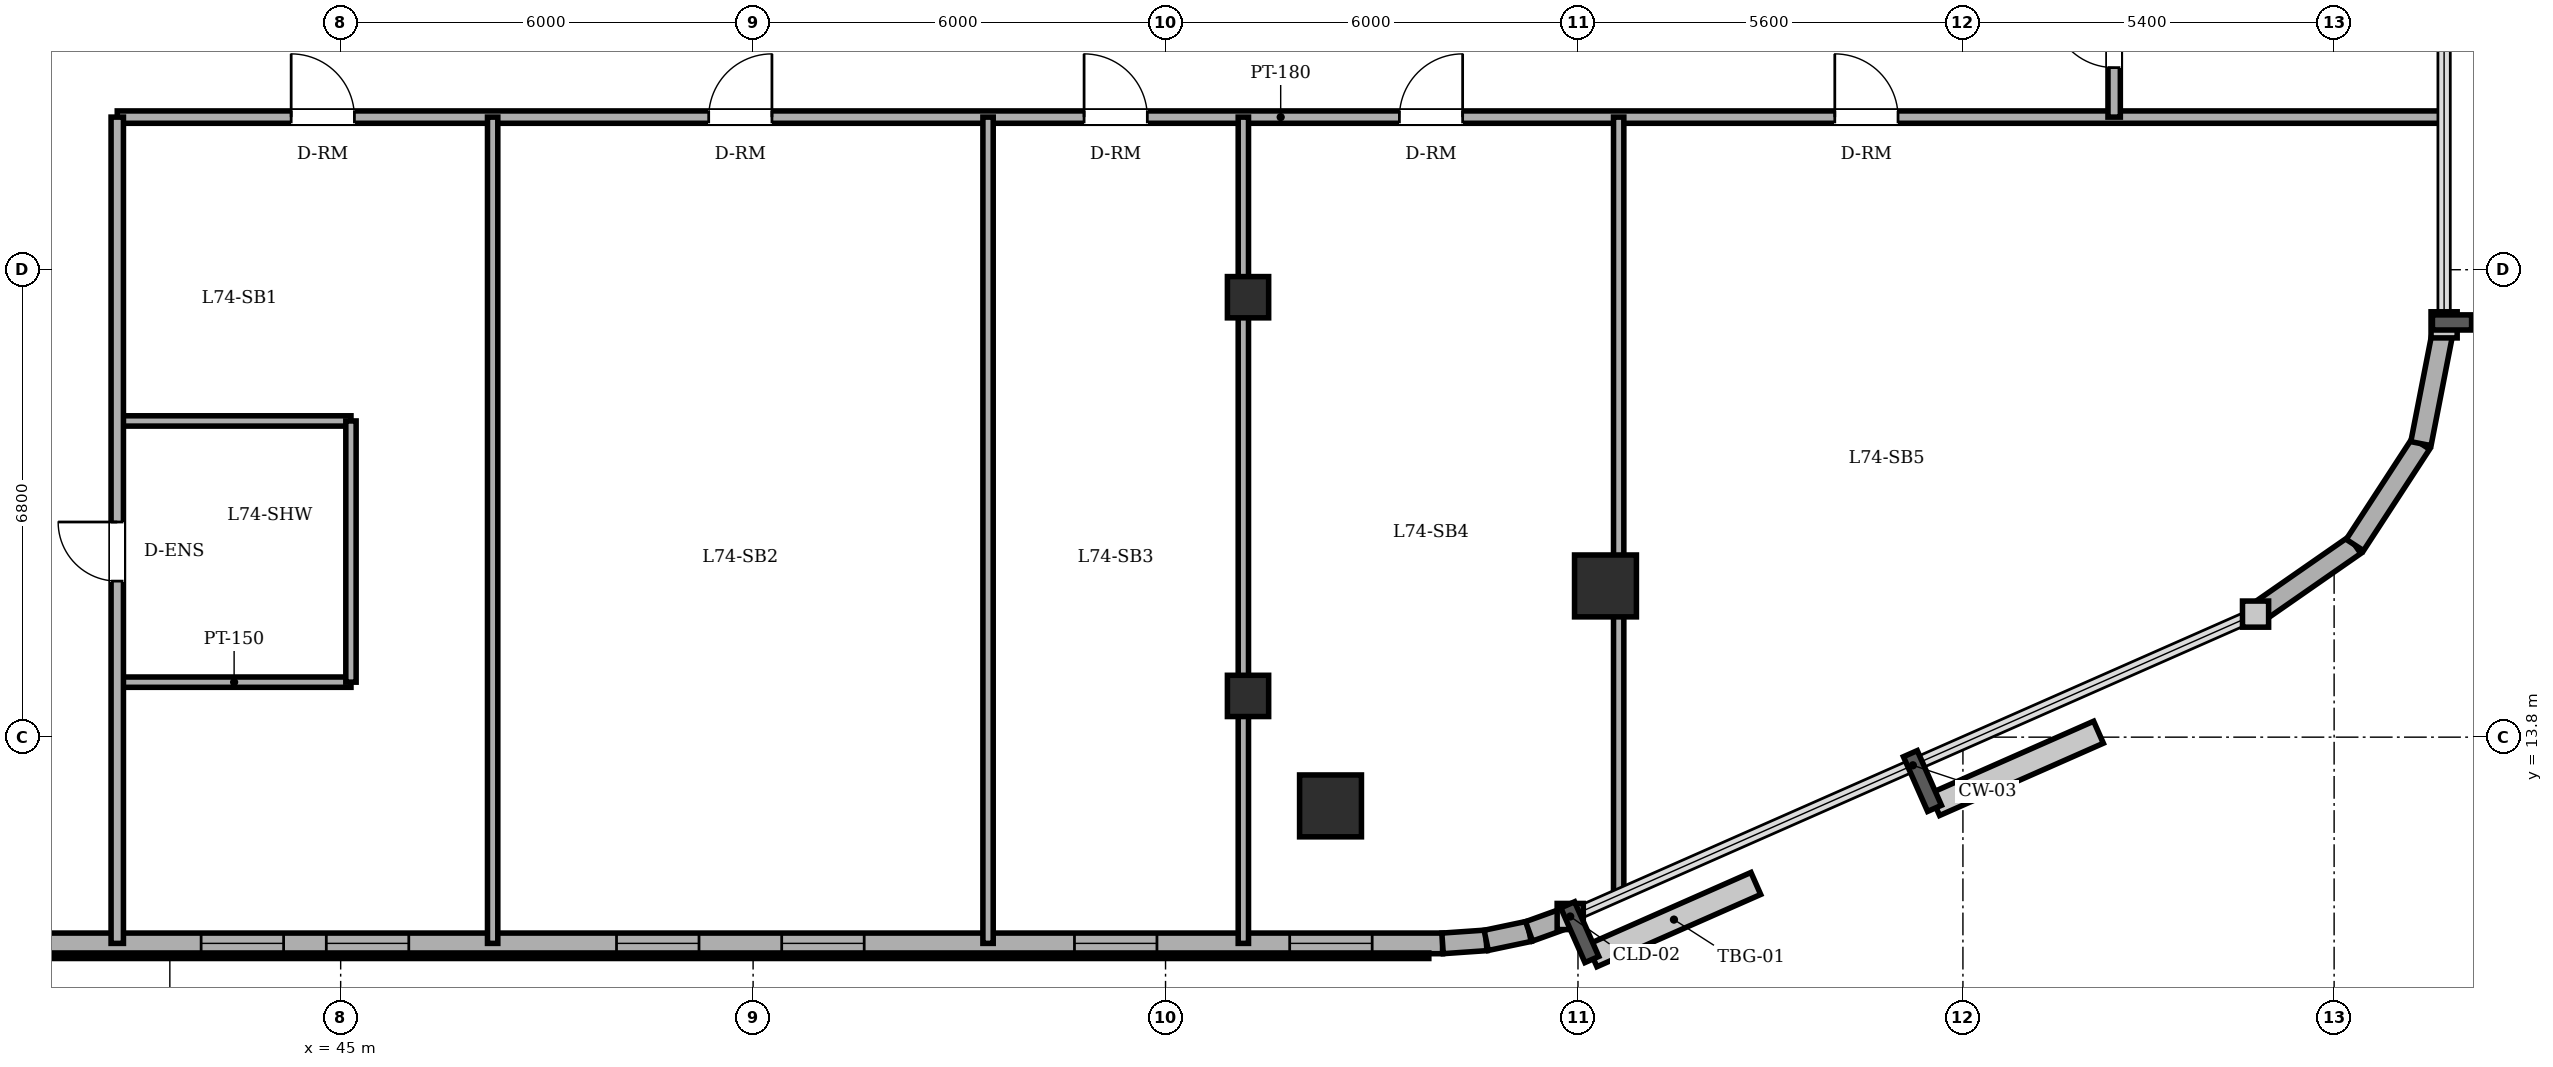
"""IFC4 building model, lengths in metres.
Left out: names, types, materials, properties, quantities, classifications, styles, units other than length and angle.
Written with IfcOpenShell. Run it as: python <this file> out.ifc"""

import sys

from ifc_helpers import new_model, si_unit, direction, frame, frame_2d, origin, origin_2d, place, context, subcontext, project, spatial, rectangle, circle, extrude, element, fill, save


model = new_model("IFC4")
c1 = context("Model", 3, precision=1e-05, world=origin(), true_north=direction((0.0, 1.0)))
c2 = subcontext(c1, "Body", "Model", "MODEL_VIEW")
j1 = project(units=[si_unit("LENGTHUNIT", "METRE"), si_unit("PLANEANGLEUNIT", "RADIAN")], contexts=[c1])
p1 = place(None, origin())
s1 = spatial("IfcSite", under=j1, at=p1, CompositionType="ELEMENT")
p2 = place(p1, origin())
s2 = spatial("IfcBuilding", under=s1, at=p2, CompositionType="ELEMENT")
p3 = place(p2, frame((0.0, 0.0, 284.35)))
s3 = spatial("IfcBuildingStorey", under=s2, at=p3, CompositionType="ELEMENT", Elevation=284.35)
for number, where, z_axis, x_axis in (
    (1, (59.4, 12.8, 0.0), (0.0, 0.0, 1.0), (1.0, 0.0, 0.0)),
    (2, (63.4, 16.0, 0.0), (0.0, 0.0, 1.0), (1.0, 0.0, 0.0)),
):
    element("IfcColumn", number, at=place(p3, frame(where, z_axis=z_axis, x_axis=x_axis)), inside=s3, PredefinedType="COLUMN", context=c2, shape_type="SweptSolid", body=[
        extrude(circle(Radius=0.45, at=origin_2d()), origin(), (0.0, 0.0, 1.0), 3.65),
    ])
for number, where, z_axis, x_axis in (
    (3, (58.2, 14.4, 0.0), (0.0, 0.0, 1.0), (1.0, 0.0, 0.0)),
    (4, (58.2, 20.2, 0.0), (0.0, 0.0, 1.0), (1.0, 0.0, 0.0)),
):
    element("IfcColumn", number, at=place(p3, frame(where, z_axis=z_axis, x_axis=x_axis)), inside=s3, PredefinedType="COLUMN", context=c2, shape_type="SweptSolid", body=[
        extrude(rectangle(XDim=0.6, YDim=0.6, at=origin_2d()), origin(), (0.0, 0.0, 1.0), 3.65),
    ])
p4 = place(p3, frame((24.0, 10.8, 0.0), z_axis=(0.0, 0.0, 1.0), x_axis=(1.0, 0.0, 0.0)))
e5 = element("IfcWall", 5, at=p4, inside=s3, PredefinedType="SOLIDWALL", context=c2, shape_type="SweptSolid", body=[
    extrude(rectangle(XDim=37.03, YDim=0.3, at=frame_2d((18.515, 0.0))), origin(), (0.0, 0.0, 1.0), 3.45),
])
p5 = place(p4, frame((10.875, 0.0, 0.0)))
e6 = element("IfcOpeningElement", 6, at=p5, cuts=e5, PredefinedType="OPENING", context=c2, shape_type="SweptSolid", body=[
    extrude(rectangle(XDim=0.95, YDim=2.2, at=frame_2d((0.475, 1.1))), frame((0.0, 0.16, 0.0), z_axis=(0.0, -1.0, 0.0), x_axis=(1.0, 0.0, 0.0)), (0.0, 0.0, 1.0), 0.32),
])
p6 = place(p4, frame((5.55, 0.0, 0.85)))
e7 = element("IfcOpeningElement", 7, at=p6, cuts=e5, PredefinedType="OPENING", context=c2, shape_type="SweptSolid", body=[
    extrude(rectangle(XDim=1.2, YDim=1.6, at=frame_2d((0.6, 0.8))), frame((0.0, 0.16, 0.0), z_axis=(0.0, -1.0, 0.0), x_axis=(1.0, 0.0, 0.0)), (0.0, 0.0, 1.0), 0.32),
])
p7 = place(p4, frame((18.97, 0.0, 0.85)))
e8 = element("IfcOpeningElement", 8, at=p7, cuts=e5, PredefinedType="OPENING", context=c2, shape_type="SweptSolid", body=[
    extrude(rectangle(XDim=1.2, YDim=1.6, at=frame_2d((0.6, 0.8))), frame((0.0, 0.16, 0.0), z_axis=(0.0, -1.0, 0.0), x_axis=(1.0, 0.0, 0.0)), (0.0, 0.0, 1.0), 0.32),
])
p8 = place(p4, frame((20.791, 0.0, 0.85)))
e9 = element("IfcOpeningElement", 9, at=p8, cuts=e5, PredefinedType="OPENING", context=c2, shape_type="SweptSolid", body=[
    extrude(rectangle(XDim=1.2, YDim=1.6, at=frame_2d((0.6, 0.8))), frame((0.0, 0.16, 0.0), z_axis=(0.0, -1.0, 0.0), x_axis=(1.0, 0.0, 0.0)), (0.0, 0.0, 1.0), 0.32),
])
p9 = place(p4, frame((25.013, 0.0, 0.85)))
e10 = element("IfcOpeningElement", 10, at=p9, cuts=e5, PredefinedType="OPENING", context=c2, shape_type="SweptSolid", body=[
    extrude(rectangle(XDim=1.2, YDim=1.6, at=frame_2d((0.6, 0.8))), frame((0.0, 0.16, 0.0), z_axis=(0.0, -1.0, 0.0), x_axis=(1.0, 0.0, 0.0)), (0.0, 0.0, 1.0), 0.32),
])
p10 = place(p4, frame((27.416, 0.0, 0.85)))
e11 = element("IfcOpeningElement", 11, at=p10, cuts=e5, PredefinedType="OPENING", context=c2, shape_type="SweptSolid", body=[
    extrude(rectangle(XDim=1.2, YDim=1.6, at=frame_2d((0.6, 0.8))), frame((0.0, 0.16, 0.0), z_axis=(0.0, -1.0, 0.0), x_axis=(1.0, 0.0, 0.0)), (0.0, 0.0, 1.0), 0.32),
])
p11 = place(p4, frame((31.675, 0.0, 0.85)))
e12 = element("IfcOpeningElement", 12, at=p11, cuts=e5, PredefinedType="OPENING", context=c2, shape_type="SweptSolid", body=[
    extrude(rectangle(XDim=1.2, YDim=1.6, at=frame_2d((0.6, 0.8))), frame((0.0, 0.16, 0.0), z_axis=(0.0, -1.0, 0.0), x_axis=(1.0, 0.0, 0.0)), (0.0, 0.0, 1.0), 0.32),
])
p12 = place(p4, frame((34.806, 0.0, 0.85)))
e13 = element("IfcOpeningElement", 13, at=p12, cuts=e5, PredefinedType="OPENING", context=c2, shape_type="SweptSolid", body=[
    extrude(rectangle(XDim=1.2, YDim=1.6, at=frame_2d((0.6, 0.8))), frame((0.0, 0.16, 0.0), z_axis=(0.0, -1.0, 0.0), x_axis=(1.0, 0.0, 0.0)), (0.0, 0.0, 1.0), 0.32),
])
p13 = place(p3, frame((61.03, 10.8, 0.0), z_axis=(0.0, 0.0, 1.0), x_axis=(0.997613959688, 0.069039028352, 0.0)))
e14 = element("IfcWall", 14, at=p13, inside=s3, PredefinedType="SOLIDWALL", context=c2, shape_type="SweptSolid", body=[
    extrude(rectangle(XDim=0.636, YDim=0.3, at=frame_2d((0.318, 0.0))), origin(), (0.0, 0.0, 1.0), 3.45),
])
p14 = place(p3, frame((61.665, 10.844, 0.0), z_axis=(0.0, 0.0, 1.0), x_axis=(0.97857012251, 0.205913854149, 0.0)))
e15 = element("IfcWall", 15, at=p14, inside=s3, PredefinedType="SOLIDWALL", context=c2, shape_type="SweptSolid", body=[
    extrude(rectangle(XDim=0.637, YDim=0.3, at=frame_2d((0.318, 0.0))), origin(), (0.0, 0.0, 1.0), 3.45),
])
p15 = place(p3, frame((62.288, 10.975, 0.0), z_axis=(0.0, 0.0, 1.0), x_axis=(0.94077491148, 0.339031806665, 0.0)))
e16 = element("IfcWall", 16, at=p15, inside=s3, PredefinedType="SOLIDWALL", context=c2, shape_type="SweptSolid", body=[
    extrude(rectangle(XDim=0.636, YDim=0.3, at=frame_2d((0.318, 0.0))), origin(), (0.0, 0.0, 1.0), 3.45),
])
p16 = place(p3, frame((72.857, 15.59, 0.0), z_axis=(0.0, 0.0, 1.0), x_axis=(0.821006966142, 0.570918174124, 0.0)))
e17 = element("IfcWall", 17, at=p16, inside=s3, PredefinedType="SOLIDWALL", context=c2, shape_type="SweptSolid", body=[
    extrude(rectangle(XDim=1.76, YDim=0.3, at=frame_2d((0.88, 0.0))), origin(), (0.0, 0.0, 1.0), 3.45),
])
for number, where, z_axis, x_axis in (
    (18, (74.302, 16.595, 0.0), (0.0, 0.0, 1.0), (0.546, 0.838, 0.0)),
    (19, (75.263, 18.07, 0.0), (0.0, 0.0, 1.0), (0.192, 0.981, 0.0)),
):
    element("IfcWall", number, at=place(p3, frame(where, z_axis=z_axis, x_axis=x_axis)), inside=s3, PredefinedType="SOLIDWALL", context=c2, shape_type="SweptSolid", body=[
        extrude(rectangle(XDim=1.76, YDim=0.3, at=frame_2d((0.88, 0.0))), origin(), (0.0, 0.0, 1.0), 3.45),
    ])
p17 = place(p3, frame((41.75, 14.6, 0.0), z_axis=(0.0, 0.0, 1.0), x_axis=(1.0, 0.0, 0.0)))
e20 = element("IfcWall", 20, at=p17, inside=s3, PredefinedType="PARTITIONING", context=c2, shape_type="SweptSolid", body=[
    extrude(rectangle(XDim=3.4, YDim=0.15, at=frame_2d((1.7, 0.0))), origin(), (0.0, 0.0, 1.0), 3.092),
])
p18 = place(p3, frame((41.75, 18.4, 0.0), z_axis=(0.0, 0.0, 1.0), x_axis=(1.0, 0.0, 0.0)))
e21 = element("IfcWall", 21, at=p18, inside=s3, PredefinedType="PARTITIONING", context=c2, shape_type="SweptSolid", body=[
    extrude(rectangle(XDim=3.4, YDim=0.15, at=frame_2d((1.7, 0.0))), origin(), (0.0, 0.0, 1.0), 3.132),
])
p19 = place(p3, frame((41.75, 22.82, 0.0), z_axis=(0.0, 0.0, 1.0), x_axis=(1.0, 0.0, 0.0)))
e22 = element("IfcWall", 22, at=p19, inside=s3, PredefinedType="PARTITIONING", context=c2, shape_type="SweptSolid", body=[
    extrude(rectangle(XDim=33.85, YDim=0.18, at=frame_2d((16.925, 0.0))), origin(), (0.0, 0.0, 1.0), 3.45),
])
p20 = place(p19, frame((2.53, 0.0, 0.0)))
e23 = element("IfcOpeningElement", 23, at=p20, cuts=e22, PredefinedType="OPENING", context=c2, shape_type="SweptSolid", body=[
    extrude(rectangle(XDim=0.92, YDim=2.1, at=frame_2d((0.46, 1.05))), frame((0.0, 0.1, 0.0), z_axis=(0.0, -1.0, 0.0), x_axis=(1.0, 0.0, 0.0)), (0.0, 0.0, 1.0), 0.2),
])
p21 = place(p19, frame((8.604, 0.0, 0.0)))
e24 = element("IfcOpeningElement", 24, at=p21, cuts=e22, PredefinedType="OPENING", context=c2, shape_type="SweptSolid", body=[
    extrude(rectangle(XDim=0.92, YDim=2.1, at=frame_2d((0.46, 1.05))), frame((0.0, 0.1, 0.0), z_axis=(0.0, -1.0, 0.0), x_axis=(1.0, 0.0, 0.0)), (0.0, 0.0, 1.0), 0.2),
])
p22 = place(p19, frame((14.065, 0.0, 0.0)))
e25 = element("IfcOpeningElement", 25, at=p22, cuts=e22, PredefinedType="OPENING", context=c2, shape_type="SweptSolid", body=[
    extrude(rectangle(XDim=0.92, YDim=2.1, at=frame_2d((0.46, 1.05))), frame((0.0, 0.1, 0.0), z_axis=(0.0, -1.0, 0.0), x_axis=(1.0, 0.0, 0.0)), (0.0, 0.0, 1.0), 0.2),
])
p23 = place(p19, frame((18.652, 0.0, 0.0)))
e26 = element("IfcOpeningElement", 26, at=p23, cuts=e22, PredefinedType="OPENING", context=c2, shape_type="SweptSolid", body=[
    extrude(rectangle(XDim=0.92, YDim=2.1, at=frame_2d((0.46, 1.05))), frame((0.0, 0.1, 0.0), z_axis=(0.0, -1.0, 0.0), x_axis=(1.0, 0.0, 0.0)), (0.0, 0.0, 1.0), 0.2),
])
p24 = place(p19, frame((24.986, 0.0, 0.0)))
e27 = element("IfcOpeningElement", 27, at=p24, cuts=e22, PredefinedType="OPENING", context=c2, shape_type="SweptSolid", body=[
    extrude(rectangle(XDim=0.92, YDim=2.1, at=frame_2d((0.46, 1.05))), frame((0.0, 0.1, 0.0), z_axis=(0.0, -1.0, 0.0), x_axis=(1.0, 0.0, 0.0)), (0.0, 0.0, 1.0), 0.2),
])
p25 = place(p3, frame((41.75, 10.8, 0.0), z_axis=(0.0, 0.0, 1.0), x_axis=(0.0, 1.0, 0.0)))
e28 = element("IfcWall", 28, at=p25, inside=s3, PredefinedType="PARTITIONING", context=c2, shape_type="SweptSolid", body=[
    extrude(rectangle(XDim=12.02, YDim=0.18, at=frame_2d((6.01, 0.0))), origin(), (0.0, 0.0, 1.0), 3.45),
])
p26 = place(p25, frame((5.27, 0.0, 0.0)))
e29 = element("IfcOpeningElement", 29, at=p26, cuts=e28, PredefinedType="OPENING", context=c2, shape_type="SweptSolid", body=[
    extrude(rectangle(XDim=0.86, YDim=2.1, at=frame_2d((0.43, 1.05))), frame((0.0, 0.1, 0.0), z_axis=(0.0, -1.0, 0.0), x_axis=(1.0, 0.0, 0.0)), (0.0, 0.0, 1.0), 0.2),
])
p27 = place(p3, frame((45.15, 14.6, 0.0), z_axis=(0.0, 0.0, 1.0), x_axis=(0.0, 1.0, 0.0)))
e30 = element("IfcWall", 30, at=p27, inside=s3, PredefinedType="PARTITIONING", context=c2, shape_type="SweptSolid", body=[
    extrude(rectangle(XDim=3.8, YDim=0.15, at=frame_2d((1.9, 0.0))), origin(), (0.0, 0.0, 1.0), 3.45),
])
for number, where, z_axis, x_axis in (
    (31, (47.211, 10.8, 0.0), (0.0, 0.0, 1.0), (0.0, 1.0, 0.0)),
    (32, (54.418, 10.8, 0.0), (0.0, 0.0, 1.0), (0.0, 1.0, 0.0)),
):
    element("IfcWall", number, at=place(p3, frame(where, z_axis=z_axis, x_axis=x_axis)), inside=s3, PredefinedType="PARTITIONING", context=c2, shape_type="SweptSolid", body=[
        extrude(rectangle(XDim=12.02, YDim=0.15, at=frame_2d((6.01, 0.0))), origin(), (0.0, 0.0, 1.0), 3.45),
    ])
p28 = place(p3, frame((58.132, 10.8, 0.0), z_axis=(0.0, 0.0, 1.0), x_axis=(0.0, 1.0, 0.0)))
e33 = element("IfcWall", 33, at=p28, inside=s3, PredefinedType="PARTITIONING", context=c2, shape_type="SweptSolid", body=[
    extrude(rectangle(XDim=12.02, YDim=0.15, at=frame_2d((6.01, 0.0))), origin(), (0.0, 0.0, 1.0), 3.032),
])
p29 = place(p3, frame((63.592, 11.502, 0.0), z_axis=(0.0, 0.0, 1.0), x_axis=(0.0, 1.0, 0.0)))
e34 = element("IfcWall", 34, at=p29, inside=s3, PredefinedType="PARTITIONING", context=c2, shape_type="SweptSolid", body=[
    extrude(rectangle(XDim=11.318, YDim=0.15, at=frame_2d((5.659, 0.0))), origin(), (0.0, 0.0, 1.0), 2.932),
])
p30 = place(p3, frame((70.8, 22.82, 0.0), z_axis=(0.0, 0.0, 1.0), x_axis=(0.0, 1.0, 0.0)))
e35 = element("IfcWall", 35, at=p30, inside=s3, PredefinedType="PARTITIONING", context=c2, shape_type="SweptSolid", body=[
    extrude(rectangle(XDim=2.36, YDim=0.18, at=frame_2d((1.18, 0.0))), origin(), (0.0, 0.0, 1.0), 3.45),
])
p31 = place(p30, frame((0.72, 0.0, 0.0)))
e36 = element("IfcOpeningElement", 36, at=p31, cuts=e35, PredefinedType="OPENING", context=c2, shape_type="SweptSolid", body=[
    extrude(rectangle(XDim=0.92, YDim=2.1, at=frame_2d((0.46, 1.05))), frame((0.0, 0.1, 0.0), z_axis=(0.0, -1.0, 0.0), x_axis=(1.0, 0.0, 0.0)), (0.0, 0.0, 1.0), 0.2),
])
p32 = place(p7, origin())
e37 = element("IfcWindow", 37, at=p32, inside=s3, PartitioningType="SINGLE_PANEL", PredefinedType="WINDOW", context=c2, shape_type="SweptSolid", body=[
    extrude(rectangle(XDim=1.2, YDim=1.6, at=frame_2d((0.6, 0.8))), frame((0.0, 0.03, 0.0), z_axis=(0.0, -1.0, 0.0), x_axis=(1.0, 0.0, 0.0)), (0.0, 0.0, 1.0), 0.06),
])
fill(e8, e37)
p33 = place(p8, origin())
e38 = element("IfcWindow", 38, at=p33, inside=s3, PartitioningType="SINGLE_PANEL", PredefinedType="WINDOW", context=c2, shape_type="SweptSolid", body=[
    extrude(rectangle(XDim=1.2, YDim=1.6, at=frame_2d((0.6, 0.8))), frame((0.0, 0.03, 0.0), z_axis=(0.0, -1.0, 0.0), x_axis=(1.0, 0.0, 0.0)), (0.0, 0.0, 1.0), 0.06),
])
fill(e9, e38)
p34 = place(p9, origin())
e39 = element("IfcWindow", 39, at=p34, inside=s3, PartitioningType="SINGLE_PANEL", PredefinedType="WINDOW", context=c2, shape_type="SweptSolid", body=[
    extrude(rectangle(XDim=1.2, YDim=1.6, at=frame_2d((0.6, 0.8))), frame((0.0, 0.03, 0.0), z_axis=(0.0, -1.0, 0.0), x_axis=(1.0, 0.0, 0.0)), (0.0, 0.0, 1.0), 0.06),
])
fill(e10, e39)
p35 = place(p10, origin())
e40 = element("IfcWindow", 40, at=p35, inside=s3, PartitioningType="SINGLE_PANEL", PredefinedType="WINDOW", context=c2, shape_type="SweptSolid", body=[
    extrude(rectangle(XDim=1.2, YDim=1.6, at=frame_2d((0.6, 0.8))), frame((0.0, 0.03, 0.0), z_axis=(0.0, -1.0, 0.0), x_axis=(1.0, 0.0, 0.0)), (0.0, 0.0, 1.0), 0.06),
])
fill(e11, e40)
p36 = place(p11, origin())
e41 = element("IfcWindow", 41, at=p36, inside=s3, PartitioningType="SINGLE_PANEL", PredefinedType="WINDOW", context=c2, shape_type="SweptSolid", body=[
    extrude(rectangle(XDim=1.2, YDim=1.6, at=frame_2d((0.6, 0.8))), frame((0.0, 0.03, 0.0), z_axis=(0.0, -1.0, 0.0), x_axis=(1.0, 0.0, 0.0)), (0.0, 0.0, 1.0), 0.06),
])
fill(e12, e41)
p37 = place(p12, origin())
e42 = element("IfcWindow", 42, at=p37, inside=s3, PartitioningType="SINGLE_PANEL", PredefinedType="WINDOW", context=c2, shape_type="SweptSolid", body=[
    extrude(rectangle(XDim=1.2, YDim=1.6, at=frame_2d((0.6, 0.8))), frame((0.0, 0.03, 0.0), z_axis=(0.0, -1.0, 0.0), x_axis=(1.0, 0.0, 0.0)), (0.0, 0.0, 1.0), 0.06),
])
fill(e13, e42)
p38 = place(p26, origin())
e43 = element("IfcDoor", 43, at=p38, inside=s3, OperationType="SINGLE_SWING_RIGHT", PredefinedType="DOOR", context=c2, shape_type="SweptSolid", body=[
    extrude(rectangle(XDim=0.86, YDim=2.1, at=frame_2d((0.43, 1.05))), frame((0.0, 0.025, 0.0), z_axis=(0.0, -1.0, 0.0), x_axis=(1.0, 0.0, 0.0)), (0.0, 0.0, 1.0), 0.05),
])
fill(e29, e43)
p39 = place(p20, origin())
e44 = element("IfcDoor", 44, at=p39, inside=s3, OperationType="SINGLE_SWING_LEFT", PredefinedType="DOOR", context=c2, shape_type="SweptSolid", body=[
    extrude(rectangle(XDim=0.92, YDim=2.1, at=frame_2d((0.46, 1.05))), frame((0.0, 0.025, 0.0), z_axis=(0.0, -1.0, 0.0), x_axis=(1.0, 0.0, 0.0)), (0.0, 0.0, 1.0), 0.05),
])
fill(e23, e44)
p40 = place(p21, origin())
e45 = element("IfcDoor", 45, at=p40, inside=s3, OperationType="SINGLE_SWING_RIGHT", PredefinedType="DOOR", context=c2, shape_type="SweptSolid", body=[
    extrude(rectangle(XDim=0.92, YDim=2.1, at=frame_2d((0.46, 1.05))), frame((0.0, 0.025, 0.0), z_axis=(0.0, -1.0, 0.0), x_axis=(1.0, 0.0, 0.0)), (0.0, 0.0, 1.0), 0.05),
])
fill(e24, e45)
p41 = place(p22, origin())
e46 = element("IfcDoor", 46, at=p41, inside=s3, OperationType="SINGLE_SWING_LEFT", PredefinedType="DOOR", context=c2, shape_type="SweptSolid", body=[
    extrude(rectangle(XDim=0.92, YDim=2.1, at=frame_2d((0.46, 1.05))), frame((0.0, 0.025, 0.0), z_axis=(0.0, -1.0, 0.0), x_axis=(1.0, 0.0, 0.0)), (0.0, 0.0, 1.0), 0.05),
])
fill(e25, e46)
p42 = place(p23, origin())
e47 = element("IfcDoor", 47, at=p42, inside=s3, OperationType="SINGLE_SWING_RIGHT", PredefinedType="DOOR", context=c2, shape_type="SweptSolid", body=[
    extrude(rectangle(XDim=0.92, YDim=2.1, at=frame_2d((0.46, 1.05))), frame((0.0, 0.025, 0.0), z_axis=(0.0, -1.0, 0.0), x_axis=(1.0, 0.0, 0.0)), (0.0, 0.0, 1.0), 0.05),
])
fill(e26, e47)
p43 = place(p24, origin())
e48 = element("IfcDoor", 48, at=p43, inside=s3, OperationType="SINGLE_SWING_LEFT", PredefinedType="DOOR", context=c2, shape_type="SweptSolid", body=[
    extrude(rectangle(XDim=0.92, YDim=2.1, at=frame_2d((0.46, 1.05))), frame((0.0, 0.025, 0.0), z_axis=(0.0, -1.0, 0.0), x_axis=(1.0, 0.0, 0.0)), (0.0, 0.0, 1.0), 0.05),
])
fill(e27, e48)
p44 = place(p31, origin())
e49 = element("IfcDoor", 49, at=p44, inside=s3, OperationType="SINGLE_SWING_RIGHT", PredefinedType="DOOR", context=c2, shape_type="SweptSolid", body=[
    extrude(rectangle(XDim=0.92, YDim=2.1, at=frame_2d((0.46, 1.05))), frame((0.0, 0.025, 0.0), z_axis=(0.0, -1.0, 0.0), x_axis=(1.0, 0.0, 0.0)), (0.0, 0.0, 1.0), 0.05),
])
fill(e36, e49)
save(model, sys.argv[1])
